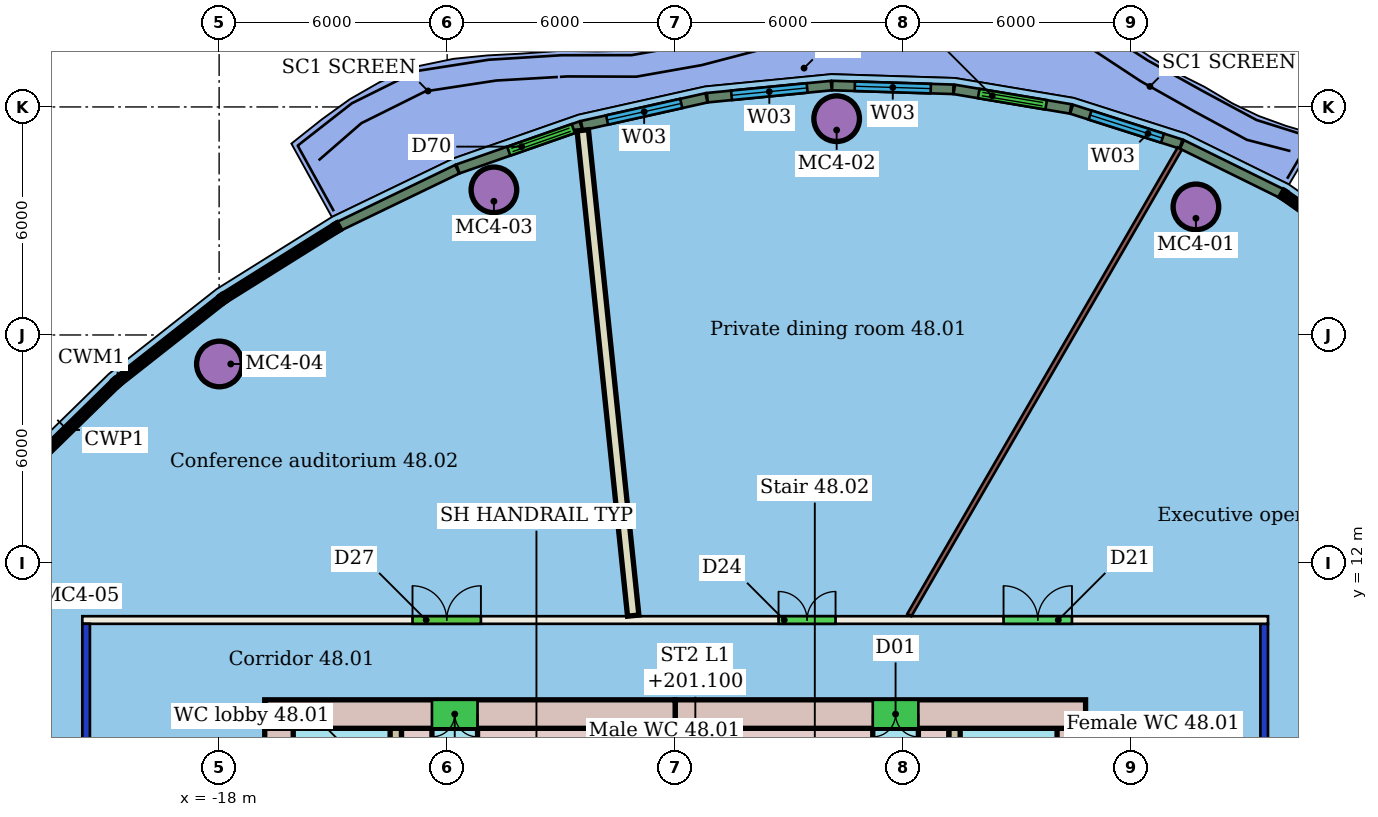
"""IFC4 building model, lengths in metres.
Left out: names, types, materials, properties, quantities, classifications, styles, units other than length and angle.
Written with IfcOpenShell. Run it as: python <this file> out.ifc"""

import sys

from ifc_helpers import new_model, si_unit, direction, frame, frame_2d, origin, origin_2d, place, context, subcontext, project, spatial, rectangle, hollow_circle, extrude, element, fill, save


model = new_model("IFC4")
c1 = context("Model", 3, precision=1e-05, world=origin(), true_north=direction((0.0, 1.0)))
c2 = subcontext(c1, "Body", "Model", "MODEL_VIEW")
j1 = project(units=[si_unit("LENGTHUNIT", "METRE"), si_unit("PLANEANGLEUNIT", "RADIAN")], contexts=[c1])
p1 = place(None, origin())
s1 = spatial("IfcSite", under=j1, at=p1, CompositionType="ELEMENT")
p2 = place(p1, origin())
s2 = spatial("IfcBuilding", under=s1, at=p2, CompositionType="ELEMENT")
p3 = place(p2, frame((0.0, 0.0, 199.3)))
s3 = spatial("IfcBuildingStorey", under=s2, at=p3, CompositionType="ELEMENT", Elevation=199.3)
for number, where, z_axis, x_axis in (
    (1, (7.704, 21.37, 0.0), (0.0, 0.0, 1.0), (1.0, 0.0, 0.0)),
    (2, (-1.75, 23.691, 0.0), (0.0, 0.0, 1.0), (1.0, 0.0, 0.0)),
    (3, (-10.769, 21.819, 0.0), (0.0, 0.0, 1.0), (1.0, 0.0, 0.0)),
    (4, (-17.993, 17.237, 0.0), (0.0, 0.0, 1.0), (1.0, 0.0, 0.0)),
):
    element("IfcColumn", number, at=place(p3, frame(where, z_axis=z_axis, x_axis=x_axis)), inside=s3, PredefinedType="COLUMN", context=c2, shape_type="SweptSolid", body=[
        extrude(hollow_circle(Radius=0.6, WallThickness=0.045, at=origin_2d()), origin(), (0.0, 0.0, 1.0), 3.45),
    ])
p4 = place(p3, frame((-21.5, -10.4, 0.0), z_axis=(0.0, 0.0, 1.0), x_axis=(0.0, 1.0, 0.0)))
e5 = element("IfcWall", 5, at=p4, inside=s3, PredefinedType="PARTITIONING", context=c2, shape_type="SweptSolid", body=[
    extrude(rectangle(XDim=20.8, YDim=0.2, at=frame_2d((10.4, 0.0))), origin(), (0.0, 0.0, 1.0), 3.05),
])
p5 = place(p4, frame((10.705, 0.0, 0.0)))
e6 = element("IfcOpeningElement", 6, at=p5, cuts=e5, PredefinedType="OPENING", context=c2, shape_type="SweptSolid", body=[
    extrude(rectangle(XDim=1.8, YDim=2.4, at=frame_2d((0.9, 1.2))), frame((0.0, 0.11, 0.0), z_axis=(0.0, -1.0, 0.0), x_axis=(1.0, 0.0, 0.0)), (0.0, 0.0, 1.0), 0.22),
])
p6 = place(p3, frame((-21.6, 10.5, 0.0), z_axis=(0.0, 0.0, 1.0), x_axis=(1.0, 0.0, 0.0)))
e7 = element("IfcWall", 7, at=p6, inside=s3, PredefinedType="PARTITIONING", context=c2, shape_type="SweptSolid", body=[
    extrude(rectangle(XDim=31.2, YDim=0.2, at=frame_2d((15.6, 0.0))), origin(), (0.0, 0.0, 1.0), 3.45),
])
p7 = place(p6, frame((18.321, 0.0, 0.0)))
e8 = element("IfcOpeningElement", 8, at=p7, cuts=e7, PredefinedType="OPENING", context=c2, shape_type="SweptSolid", body=[
    extrude(rectangle(XDim=1.5, YDim=2.1, at=frame_2d((0.75, 1.05))), frame((0.0, 0.11, 0.0), z_axis=(0.0, -1.0, 0.0), x_axis=(1.0, 0.0, 0.0)), (0.0, 0.0, 1.0), 0.22),
])
p8 = place(p6, frame((8.688, 0.0, 0.0)))
e9 = element("IfcOpeningElement", 9, at=p8, cuts=e7, PredefinedType="OPENING", context=c2, shape_type="SweptSolid", body=[
    extrude(rectangle(XDim=1.8, YDim=2.4, at=frame_2d((0.9, 1.2))), frame((0.0, 0.11, 0.0), z_axis=(0.0, -1.0, 0.0), x_axis=(1.0, 0.0, 0.0)), (0.0, 0.0, 1.0), 0.22),
])
p9 = place(p6, frame((24.241, 0.0, 0.0)))
e10 = element("IfcOpeningElement", 10, at=p9, cuts=e7, PredefinedType="OPENING", context=c2, shape_type="SweptSolid", body=[
    extrude(rectangle(XDim=1.8, YDim=2.1, at=frame_2d((0.9, 1.05))), frame((0.0, 0.11, 0.0), z_axis=(0.0, -1.0, 0.0), x_axis=(1.0, 0.0, 0.0)), (0.0, 0.0, 1.0), 0.22),
])
p10 = place(p3, frame((9.5, 10.4, 0.0), z_axis=(0.0, 0.0, 1.0), x_axis=(0.0, -1.0, 0.0)))
e11 = element("IfcWall", 11, at=p10, inside=s3, PredefinedType="PARTITIONING", context=c2, shape_type="SweptSolid", body=[
    extrude(rectangle(XDim=20.8, YDim=0.2, at=frame_2d((10.4, 0.0))), origin(), (0.0, 0.0, 1.0), 3.05),
])
p11 = place(p10, frame((10.084, 0.0, 0.0)))
e12 = element("IfcOpeningElement", 12, at=p11, cuts=e11, PredefinedType="OPENING", context=c2, shape_type="SweptSolid", body=[
    extrude(rectangle(XDim=1.8, YDim=2.4, at=frame_2d((0.9, 1.2))), frame((0.0, 0.11, 0.0), z_axis=(0.0, -1.0, 0.0), x_axis=(1.0, 0.0, 0.0)), (0.0, 0.0, 1.0), 0.22),
])
p12 = place(p3, frame((7.277, 22.904, 0.0), z_axis=(0.0, 0.0, 1.0), x_axis=(-0.501519234172, -0.865146494968, 0.0)))
e13 = element("IfcWall", 13, at=p12, inside=s3, PredefinedType="PARTITIONING", context=c2, shape_type="SweptSolid", body=[
    extrude(rectangle(XDim=14.185, YDim=0.125, at=frame_2d((7.093, 0.0))), origin(), (0.0, 0.0, 1.0), 3.45),
])
p13 = place(p3, frame((-8.431, 23.386, 0.0), z_axis=(0.0, 0.0, 1.0), x_axis=(0.103405820215, -0.994639249349, 0.0)))
e14 = element("IfcWall", 14, at=p13, inside=s3, PredefinedType="PARTITIONING", context=c2, shape_type="SweptSolid", body=[
    extrude(rectangle(XDim=12.839, YDim=0.3, at=frame_2d((6.419, 0.0))), origin(), (0.0, 0.0, 1.0), 3.45),
])
p14 = place(p3, frame((-27.328, 8.511, 0.0), z_axis=(0.0, 0.0, 1.0), x_axis=(0.928768643744, -0.370659960608, 0.0)))
e15 = element("IfcWall", 15, at=p14, inside=s3, PredefinedType="PARTITIONING", context=c2, shape_type="SweptSolid", body=[
    extrude(rectangle(XDim=6.107, YDim=0.3, at=frame_2d((3.054, 0.0))), origin(), (0.0, 0.0, 1.0), 3.45),
])
p15 = place(p3, frame((9.951, 21.726, 0.0), z_axis=(0.0, 0.0, 1.0), x_axis=(-0.897141057634, 0.441744182426, 0.0)))
e16 = element("IfcWall", 16, at=p15, inside=s3, PredefinedType="SOLIDWALL", context=c2, shape_type="SweptSolid", body=[
    extrude(rectangle(XDim=2.915, YDim=0.25, at=frame_2d((1.458, 0.0))), origin(), (0.0, 0.0, 1.0), 3.1),
])
p16 = place(p3, frame((7.311, 23.024, 0.0), z_axis=(0.0, 0.0, 1.0), x_axis=(-0.952776106235, 0.303673659358, 0.0)))
e17 = element("IfcWall", 17, at=p16, inside=s3, PredefinedType="SOLIDWALL", context=c2, shape_type="SweptSolid", body=[
    extrude(rectangle(XDim=3.023, YDim=0.25, at=frame_2d((1.511, 0.0))), origin(), (0.0, 0.0, 1.0), 3.1),
])
p17 = place(p16, frame((0.511, 0.0, 0.9)))
e18 = element("IfcOpeningElement", 18, at=p17, cuts=e17, PredefinedType="OPENING", context=c2, shape_type="SweptSolid", body=[
    extrude(rectangle(XDim=2.0, YDim=2.1, at=frame_2d((1.0, 1.05))), frame((0.0, 0.135, 0.0), z_axis=(0.0, -1.0, 0.0), x_axis=(1.0, 0.0, 0.0)), (0.0, 0.0, 1.0), 0.27),
])
p18 = place(p3, frame((4.406, 23.948, 0.0), z_axis=(0.0, 0.0, 1.0), x_axis=(-0.986216863641, 0.165457843178, 0.0)))
e19 = element("IfcWall", 19, at=p18, inside=s3, PredefinedType="SOLIDWALL", context=c2, shape_type="SweptSolid", body=[
    extrude(rectangle(XDim=3.103, YDim=0.25, at=frame_2d((1.552, 0.0))), origin(), (0.0, 0.0, 1.0), 3.1),
])
p19 = place(p18, frame((0.652, 0.0, 0.0)))
e20 = element("IfcOpeningElement", 20, at=p19, cuts=e19, PredefinedType="OPENING", context=c2, shape_type="SweptSolid", body=[
    extrude(rectangle(XDim=1.8, YDim=2.4, at=frame_2d((0.9, 1.2))), frame((0.0, 0.135, 0.0), z_axis=(0.0, -1.0, 0.0), x_axis=(1.0, 0.0, 0.0)), (0.0, 0.0, 1.0), 0.27),
])
p20 = place(p3, frame((1.321, 24.464, 0.0), z_axis=(0.0, 0.0, 1.0), x_axis=(-0.999517066274, 0.031074655709, 0.0)))
e21 = element("IfcWall", 21, at=p20, inside=s3, PredefinedType="SOLIDWALL", context=c2, shape_type="SweptSolid", body=[
    extrude(rectangle(XDim=3.19, YDim=0.25, at=frame_2d((1.595, 0.0))), origin(), (0.0, 0.0, 1.0), 3.1),
])
p21 = place(p20, frame((0.595, 0.0, 0.9)))
e22 = element("IfcOpeningElement", 22, at=p21, cuts=e21, PredefinedType="OPENING", context=c2, shape_type="SweptSolid", body=[
    extrude(rectangle(XDim=2.0, YDim=2.1, at=frame_2d((1.0, 1.05))), frame((0.0, 0.135, 0.0), z_axis=(0.0, -1.0, 0.0), x_axis=(1.0, 0.0, 0.0)), (0.0, 0.0, 1.0), 0.27),
])
p22 = place(p3, frame((-1.891, 24.562, 0.0), z_axis=(0.0, 0.0, 1.0), x_axis=(-0.995263213441, -0.097216953109, 0.0)))
e23 = element("IfcWall", 23, at=p22, inside=s3, PredefinedType="SOLIDWALL", context=c2, shape_type="SweptSolid", body=[
    extrude(rectangle(XDim=3.277, YDim=0.25, at=frame_2d((1.639, 0.0))), origin(), (0.0, 0.0, 1.0), 3.1),
])
p23 = place(p22, frame((0.639, 0.0, 0.9)))
e24 = element("IfcOpeningElement", 24, at=p23, cuts=e23, PredefinedType="OPENING", context=c2, shape_type="SweptSolid", body=[
    extrude(rectangle(XDim=2.0, YDim=2.1, at=frame_2d((1.0, 1.05))), frame((0.0, 0.135, 0.0), z_axis=(0.0, -1.0, 0.0), x_axis=(1.0, 0.0, 0.0)), (0.0, 0.0, 1.0), 0.27),
])
p24 = place(p3, frame((-5.176, 24.24, 0.0), z_axis=(0.0, 0.0, 1.0), x_axis=(-0.976008895139, -0.217730651514, 0.0)))
e25 = element("IfcWall", 25, at=p24, inside=s3, PredefinedType="SOLIDWALL", context=c2, shape_type="SweptSolid", body=[
    extrude(rectangle(XDim=3.359, YDim=0.25, at=frame_2d((1.68, 0.0))), origin(), (0.0, 0.0, 1.0), 3.1),
])
p25 = place(p24, frame((0.68, 0.0, 0.9)))
e26 = element("IfcOpeningElement", 26, at=p25, cuts=e25, PredefinedType="OPENING", context=c2, shape_type="SweptSolid", body=[
    extrude(rectangle(XDim=2.0, YDim=2.1, at=frame_2d((1.0, 1.05))), frame((0.0, 0.135, 0.0), z_axis=(0.0, -1.0, 0.0), x_axis=(1.0, 0.0, 0.0)), (0.0, 0.0, 1.0), 0.27),
])
p26 = place(p3, frame((-8.477, 23.502, 0.0), z_axis=(0.0, 0.0, 1.0), x_axis=(-0.943927112693, -0.330153912475, 0.0)))
e27 = element("IfcWall", 27, at=p26, inside=s3, PredefinedType="SOLIDWALL", context=c2, shape_type="SweptSolid", body=[
    extrude(rectangle(XDim=3.431, YDim=0.25, at=frame_2d((1.716, 0.0))), origin(), (0.0, 0.0, 1.0), 3.1),
])
p27 = place(p26, frame((0.216, 0.0, 0.0)))
e28 = element("IfcOpeningElement", 28, at=p27, cuts=e27, PredefinedType="OPENING", context=c2, shape_type="SweptSolid", body=[
    extrude(rectangle(XDim=1.8, YDim=2.4, at=frame_2d((0.9, 1.2))), frame((0.0, 0.135, 0.0), z_axis=(0.0, -1.0, 0.0), x_axis=(1.0, 0.0, 0.0)), (0.0, 0.0, 1.0), 0.27),
])
p28 = place(p3, frame((-11.736, 22.361, 0.0), z_axis=(0.0, 0.0, 1.0), x_axis=(-0.900825117277, -0.43418211396, 0.0)))
e29 = element("IfcWall", 29, at=p28, inside=s3, PredefinedType="SOLIDWALL", context=c2, shape_type="SweptSolid", body=[
    extrude(rectangle(XDim=3.445, YDim=0.25, at=frame_2d((1.722, 0.0))), origin(), (0.0, 0.0, 1.0), 3.1),
])
p29 = place(p3, frame((4.8, 8.025, 0.0), z_axis=(0.0, 0.0, 1.0), x_axis=(-1.0, 0.0, 0.0)))
e30 = element("IfcWall", 30, at=p29, inside=s3, PredefinedType="SHEAR", context=c2, shape_type="SweptSolid", body=[
    extrude(rectangle(XDim=10.8, YDim=0.75, at=frame_2d((5.4, 0.0))), origin(), (0.0, 0.0, 1.0), 3.3),
])
p30 = place(p29, frame((4.4, 0.0, 0.0)))
e31 = element("IfcOpeningElement", 31, at=p30, cuts=e30, PredefinedType="OPENING", context=c2, shape_type="SweptSolid", body=[
    extrude(rectangle(XDim=1.2, YDim=2.1, at=frame_2d((0.6, 1.05))), frame((0.0, 0.385, 0.0), z_axis=(0.0, -1.0, 0.0), x_axis=(1.0, 0.0, 0.0)), (0.0, 0.0, 1.0), 0.77),
])
p31 = place(p3, frame((-6.0, 8.025, 0.0), z_axis=(0.0, 0.0, 1.0), x_axis=(-1.0, 0.0, 0.0)))
e32 = element("IfcWall", 32, at=p31, inside=s3, PredefinedType="SHEAR", context=c2, shape_type="SweptSolid", body=[
    extrude(rectangle(XDim=10.8, YDim=0.75, at=frame_2d((5.4, 0.0))), origin(), (0.0, 0.0, 1.0), 3.3),
])
p32 = place(p31, frame((5.2, 0.0, 0.0)))
e33 = element("IfcOpeningElement", 33, at=p32, cuts=e32, PredefinedType="OPENING", context=c2, shape_type="SweptSolid", body=[
    extrude(rectangle(XDim=1.2, YDim=2.1, at=frame_2d((0.6, 1.05))), frame((0.0, 0.385, 0.0), z_axis=(0.0, -1.0, 0.0), x_axis=(1.0, 0.0, 0.0)), (0.0, 0.0, 1.0), 0.77),
])
p33 = place(p3, frame((-16.425, 7.65, 0.0), z_axis=(0.0, 0.0, 1.0), x_axis=(0.0, -1.0, 0.0)))
e34 = element("IfcWall", 34, at=p33, inside=s3, PredefinedType="SHEAR", context=c2, shape_type="SweptSolid", body=[
    extrude(rectangle(XDim=15.3, YDim=0.75, at=frame_2d((7.65, 0.0))), origin(), (0.0, 0.0, 1.0), 3.3),
])
p34 = place(p33, frame((11.25, 0.0, 0.0)))
e35 = element("IfcOpeningElement", 35, at=p34, cuts=e34, PredefinedType="OPENING", context=c2, shape_type="SweptSolid", body=[
    extrude(rectangle(XDim=1.2, YDim=2.1, at=frame_2d((0.6, 1.05))), frame((0.0, 0.385, 0.0), z_axis=(0.0, -1.0, 0.0), x_axis=(1.0, 0.0, 0.0)), (0.0, 0.0, 1.0), 0.77),
])
p35 = place(p33, frame((2.85, 0.0, 0.0)))
e36 = element("IfcOpeningElement", 36, at=p35, cuts=e34, PredefinedType="OPENING", context=c2, shape_type="SweptSolid", body=[
    extrude(rectangle(XDim=1.2, YDim=2.1, at=frame_2d((0.6, 1.05))), frame((0.0, 0.385, 0.0), z_axis=(0.0, -1.0, 0.0), x_axis=(1.0, 0.0, 0.0)), (0.0, 0.0, 1.0), 0.77),
])
p36 = place(p3, frame((4.425, -7.65, 0.0), z_axis=(0.0, 0.0, 1.0), x_axis=(0.0, 1.0, 0.0)))
e37 = element("IfcWall", 37, at=p36, inside=s3, PredefinedType="SHEAR", context=c2, shape_type="SweptSolid", body=[
    extrude(rectangle(XDim=15.3, YDim=0.75, at=frame_2d((7.65, 0.0))), origin(), (0.0, 0.0, 1.0), 3.3),
])
p37 = place(p36, frame((2.85, 0.0, 0.0)))
e38 = element("IfcOpeningElement", 38, at=p37, cuts=e37, PredefinedType="OPENING", context=c2, shape_type="SweptSolid", body=[
    extrude(rectangle(XDim=1.2, YDim=2.1, at=frame_2d((0.6, 1.05))), frame((0.0, 0.385, 0.0), z_axis=(0.0, -1.0, 0.0), x_axis=(1.0, 0.0, 0.0)), (0.0, 0.0, 1.0), 0.77),
])
p38 = place(p36, frame((11.25, 0.0, 0.0)))
e39 = element("IfcOpeningElement", 39, at=p38, cuts=e37, PredefinedType="OPENING", context=c2, shape_type="SweptSolid", body=[
    extrude(rectangle(XDim=1.2, YDim=2.1, at=frame_2d((0.6, 1.05))), frame((0.0, 0.385, 0.0), z_axis=(0.0, -1.0, 0.0), x_axis=(1.0, 0.0, 0.0)), (0.0, 0.0, 1.0), 0.77),
])
p39 = place(p3, frame((-13.35, 7.65, 0.0), z_axis=(0.0, 0.0, 1.0), x_axis=(0.0, -1.0, 0.0)))
e40 = element("IfcWall", 40, at=p39, inside=s3, PredefinedType="SHEAR", context=c2, shape_type="SweptSolid", body=[
    extrude(rectangle(XDim=15.3, YDim=0.3, at=frame_2d((7.65, 0.0))), origin(), (0.0, 0.0, 1.0), 3.3),
])
p40 = place(p39, frame((6.9, 0.0, 0.0)))
e41 = element("IfcOpeningElement", 41, at=p40, cuts=e40, PredefinedType="OPENING", context=c2, shape_type="SweptSolid", body=[
    extrude(rectangle(XDim=1.5, YDim=2.1, at=frame_2d((0.75, 1.05))), frame((0.0, 0.16, 0.0), z_axis=(0.0, -1.0, 0.0), x_axis=(1.0, 0.0, 0.0)), (0.0, 0.0, 1.0), 0.32),
])
p41 = place(p3, frame((1.35, -7.65, 0.0), z_axis=(0.0, 0.0, 1.0), x_axis=(0.0, 1.0, 0.0)))
e42 = element("IfcWall", 42, at=p41, inside=s3, PredefinedType="SHEAR", context=c2, shape_type="SweptSolid", body=[
    extrude(rectangle(XDim=15.3, YDim=0.3, at=frame_2d((7.65, 0.0))), origin(), (0.0, 0.0, 1.0), 3.3),
])
p42 = place(p41, frame((1.56, 0.0, 0.0)))
e43 = element("IfcOpeningElement", 43, at=p42, cuts=e42, PredefinedType="OPENING", context=c2, shape_type="SweptSolid", body=[
    extrude(rectangle(XDim=1.0, YDim=2.1, at=frame_2d((0.5, 1.05))), frame((0.0, 0.16, 0.0), z_axis=(0.0, -1.0, 0.0), x_axis=(1.0, 0.0, 0.0)), (0.0, 0.0, 1.0), 0.32),
])
p43 = place(p41, frame((6.9, 0.0, 0.0)))
e44 = element("IfcOpeningElement", 44, at=p43, cuts=e42, PredefinedType="OPENING", context=c2, shape_type="SweptSolid", body=[
    extrude(rectangle(XDim=1.5, YDim=2.1, at=frame_2d((0.75, 1.05))), frame((0.0, 0.16, 0.0), z_axis=(0.0, -1.0, 0.0), x_axis=(1.0, 0.0, 0.0)), (0.0, 0.0, 1.0), 0.32),
])
p44 = place(p3, frame((-6.0, 3.88, 0.0), z_axis=(0.0, 0.0, 1.0), x_axis=(0.0, 1.0, 0.0)))
e45 = element("IfcWall", 45, at=p44, inside=s3, PredefinedType="SHEAR", context=c2, shape_type="SweptSolid", body=[
    extrude(rectangle(XDim=3.77, YDim=0.3, at=frame_2d((1.885, 0.0))), origin(), (0.0, 0.0, 1.0), 3.3),
])
p45 = place(p3, frame((-13.2, 7.475, 0.0), z_axis=(0.0, 0.0, 1.0), x_axis=(1.0, 0.0, 0.0)))
e46 = element("IfcWall", 46, at=p45, inside=s3, PredefinedType="SHEAR", context=c2, shape_type="SweptSolid", body=[
    extrude(rectangle(XDim=0.8, YDim=0.35, at=frame_2d((0.4, 0.0))), origin(), (0.0, 0.0, 1.0), 3.3),
])
for number, where, z_axis, x_axis in (
    (47, (-11.2, 7.475, 0.0), (0.0, 0.0, 1.0), (1.0, 0.0, 0.0)),
    (48, (-5.85, 7.475, 0.0), (0.0, 0.0, 1.0), (1.0, 0.0, 0.0)),
):
    element("IfcWall", number, at=place(p3, frame(where, z_axis=z_axis, x_axis=x_axis)), inside=s3, PredefinedType="SHEAR", context=c2, shape_type="SweptSolid", body=[
        extrude(rectangle(XDim=5.05, YDim=0.35, at=frame_2d((2.525, 0.0))), origin(), (0.0, 0.0, 1.0), 3.3),
    ])
p46 = place(p3, frame((0.4, 7.475, 0.0), z_axis=(0.0, 0.0, 1.0), x_axis=(1.0, 0.0, 0.0)))
e49 = element("IfcWall", 49, at=p46, inside=s3, PredefinedType="SHEAR", context=c2, shape_type="SweptSolid", body=[
    extrude(rectangle(XDim=0.8, YDim=0.35, at=frame_2d((0.4, 0.0))), origin(), (0.0, 0.0, 1.0), 3.3),
])
p47 = place(p7, origin())
e50 = element("IfcDoor", 50, at=p47, inside=s3, OperationType="DOUBLE_DOOR_SINGLE_SWING", PredefinedType="DOOR", context=c2, shape_type="SweptSolid", body=[
    extrude(rectangle(XDim=1.5, YDim=2.1, at=frame_2d((0.75, 1.05))), frame((0.0, 0.025, 0.0), z_axis=(0.0, -1.0, 0.0), x_axis=(1.0, 0.0, 0.0)), (0.0, 0.0, 1.0), 0.05),
])
fill(e8, e50)
p48 = place(p8, origin())
e51 = element("IfcDoor", 51, at=p48, inside=s3, OperationType="DOUBLE_DOOR_SINGLE_SWING", PredefinedType="DOOR", context=c2, shape_type="SweptSolid", body=[
    extrude(rectangle(XDim=1.8, YDim=2.4, at=frame_2d((0.9, 1.2))), frame((0.0, 0.025, 0.0), z_axis=(0.0, -1.0, 0.0), x_axis=(1.0, 0.0, 0.0)), (0.0, 0.0, 1.0), 0.05),
])
fill(e9, e51)
p49 = place(p9, origin())
e52 = element("IfcDoor", 52, at=p49, inside=s3, OperationType="DOUBLE_DOOR_SINGLE_SWING", PredefinedType="DOOR", context=c2, shape_type="SweptSolid", body=[
    extrude(rectangle(XDim=1.8, YDim=2.1, at=frame_2d((0.9, 1.05))), frame((0.0, 0.025, 0.0), z_axis=(0.0, -1.0, 0.0), x_axis=(1.0, 0.0, 0.0)), (0.0, 0.0, 1.0), 0.05),
])
fill(e10, e52)
p50 = place(p17, origin())
e53 = element("IfcWindow", 53, at=p50, inside=s3, PartitioningType="SINGLE_PANEL", PredefinedType="WINDOW", context=c2, shape_type="SweptSolid", body=[
    extrude(rectangle(XDim=2.0, YDim=2.1, at=frame_2d((1.0, 1.05))), frame((0.0, 0.03, 0.0), z_axis=(0.0, -1.0, 0.0), x_axis=(1.0, 0.0, 0.0)), (0.0, 0.0, 1.0), 0.06),
])
fill(e18, e53)
p51 = place(p19, origin())
e54 = element("IfcDoor", 54, at=p51, inside=s3, OperationType="DOUBLE_DOOR_SLIDING", PredefinedType="DOOR", context=c2, shape_type="SweptSolid", body=[
    extrude(rectangle(XDim=1.8, YDim=2.4, at=frame_2d((0.9, 1.2))), frame((0.0, 0.025, 0.0), z_axis=(0.0, -1.0, 0.0), x_axis=(1.0, 0.0, 0.0)), (0.0, 0.0, 1.0), 0.05),
])
fill(e20, e54)
p52 = place(p21, origin())
e55 = element("IfcWindow", 55, at=p52, inside=s3, PartitioningType="SINGLE_PANEL", PredefinedType="WINDOW", context=c2, shape_type="SweptSolid", body=[
    extrude(rectangle(XDim=2.0, YDim=2.1, at=frame_2d((1.0, 1.05))), frame((0.0, 0.03, 0.0), z_axis=(0.0, -1.0, 0.0), x_axis=(1.0, 0.0, 0.0)), (0.0, 0.0, 1.0), 0.06),
])
fill(e22, e55)
p53 = place(p23, origin())
e56 = element("IfcWindow", 56, at=p53, inside=s3, PartitioningType="SINGLE_PANEL", PredefinedType="WINDOW", context=c2, shape_type="SweptSolid", body=[
    extrude(rectangle(XDim=2.0, YDim=2.1, at=frame_2d((1.0, 1.05))), frame((0.0, 0.03, 0.0), z_axis=(0.0, -1.0, 0.0), x_axis=(1.0, 0.0, 0.0)), (0.0, 0.0, 1.0), 0.06),
])
fill(e24, e56)
p54 = place(p25, origin())
e57 = element("IfcWindow", 57, at=p54, inside=s3, PartitioningType="SINGLE_PANEL", PredefinedType="WINDOW", context=c2, shape_type="SweptSolid", body=[
    extrude(rectangle(XDim=2.0, YDim=2.1, at=frame_2d((1.0, 1.05))), frame((0.0, 0.03, 0.0), z_axis=(0.0, -1.0, 0.0), x_axis=(1.0, 0.0, 0.0)), (0.0, 0.0, 1.0), 0.06),
])
fill(e26, e57)
p55 = place(p27, origin())
e58 = element("IfcDoor", 58, at=p55, inside=s3, OperationType="DOUBLE_DOOR_SLIDING", PredefinedType="DOOR", context=c2, shape_type="SweptSolid", body=[
    extrude(rectangle(XDim=1.8, YDim=2.4, at=frame_2d((0.9, 1.2))), frame((0.0, 0.025, 0.0), z_axis=(0.0, -1.0, 0.0), x_axis=(1.0, 0.0, 0.0)), (0.0, 0.0, 1.0), 0.05),
])
fill(e28, e58)
p56 = place(p30, origin())
e59 = element("IfcDoor", 59, at=p56, inside=s3, OperationType="DOUBLE_DOOR_SINGLE_SWING", PredefinedType="NOTDEFINED", context=c2, shape_type="SweptSolid", body=[
    extrude(rectangle(XDim=1.2, YDim=2.1, at=frame_2d((0.6, 1.05))), frame((0.0, 0.025, 0.0), z_axis=(0.0, -1.0, 0.0), x_axis=(1.0, 0.0, 0.0)), (0.0, 0.0, 1.0), 0.05),
])
fill(e31, e59)
p57 = place(p32, origin())
e60 = element("IfcDoor", 60, at=p57, inside=s3, OperationType="DOUBLE_DOOR_SINGLE_SWING", PredefinedType="NOTDEFINED", context=c2, shape_type="SweptSolid", body=[
    extrude(rectangle(XDim=1.2, YDim=2.1, at=frame_2d((0.6, 1.05))), frame((0.0, 0.025, 0.0), z_axis=(0.0, -1.0, 0.0), x_axis=(1.0, 0.0, 0.0)), (0.0, 0.0, 1.0), 0.05),
])
fill(e33, e60)
save(model, sys.argv[1])
